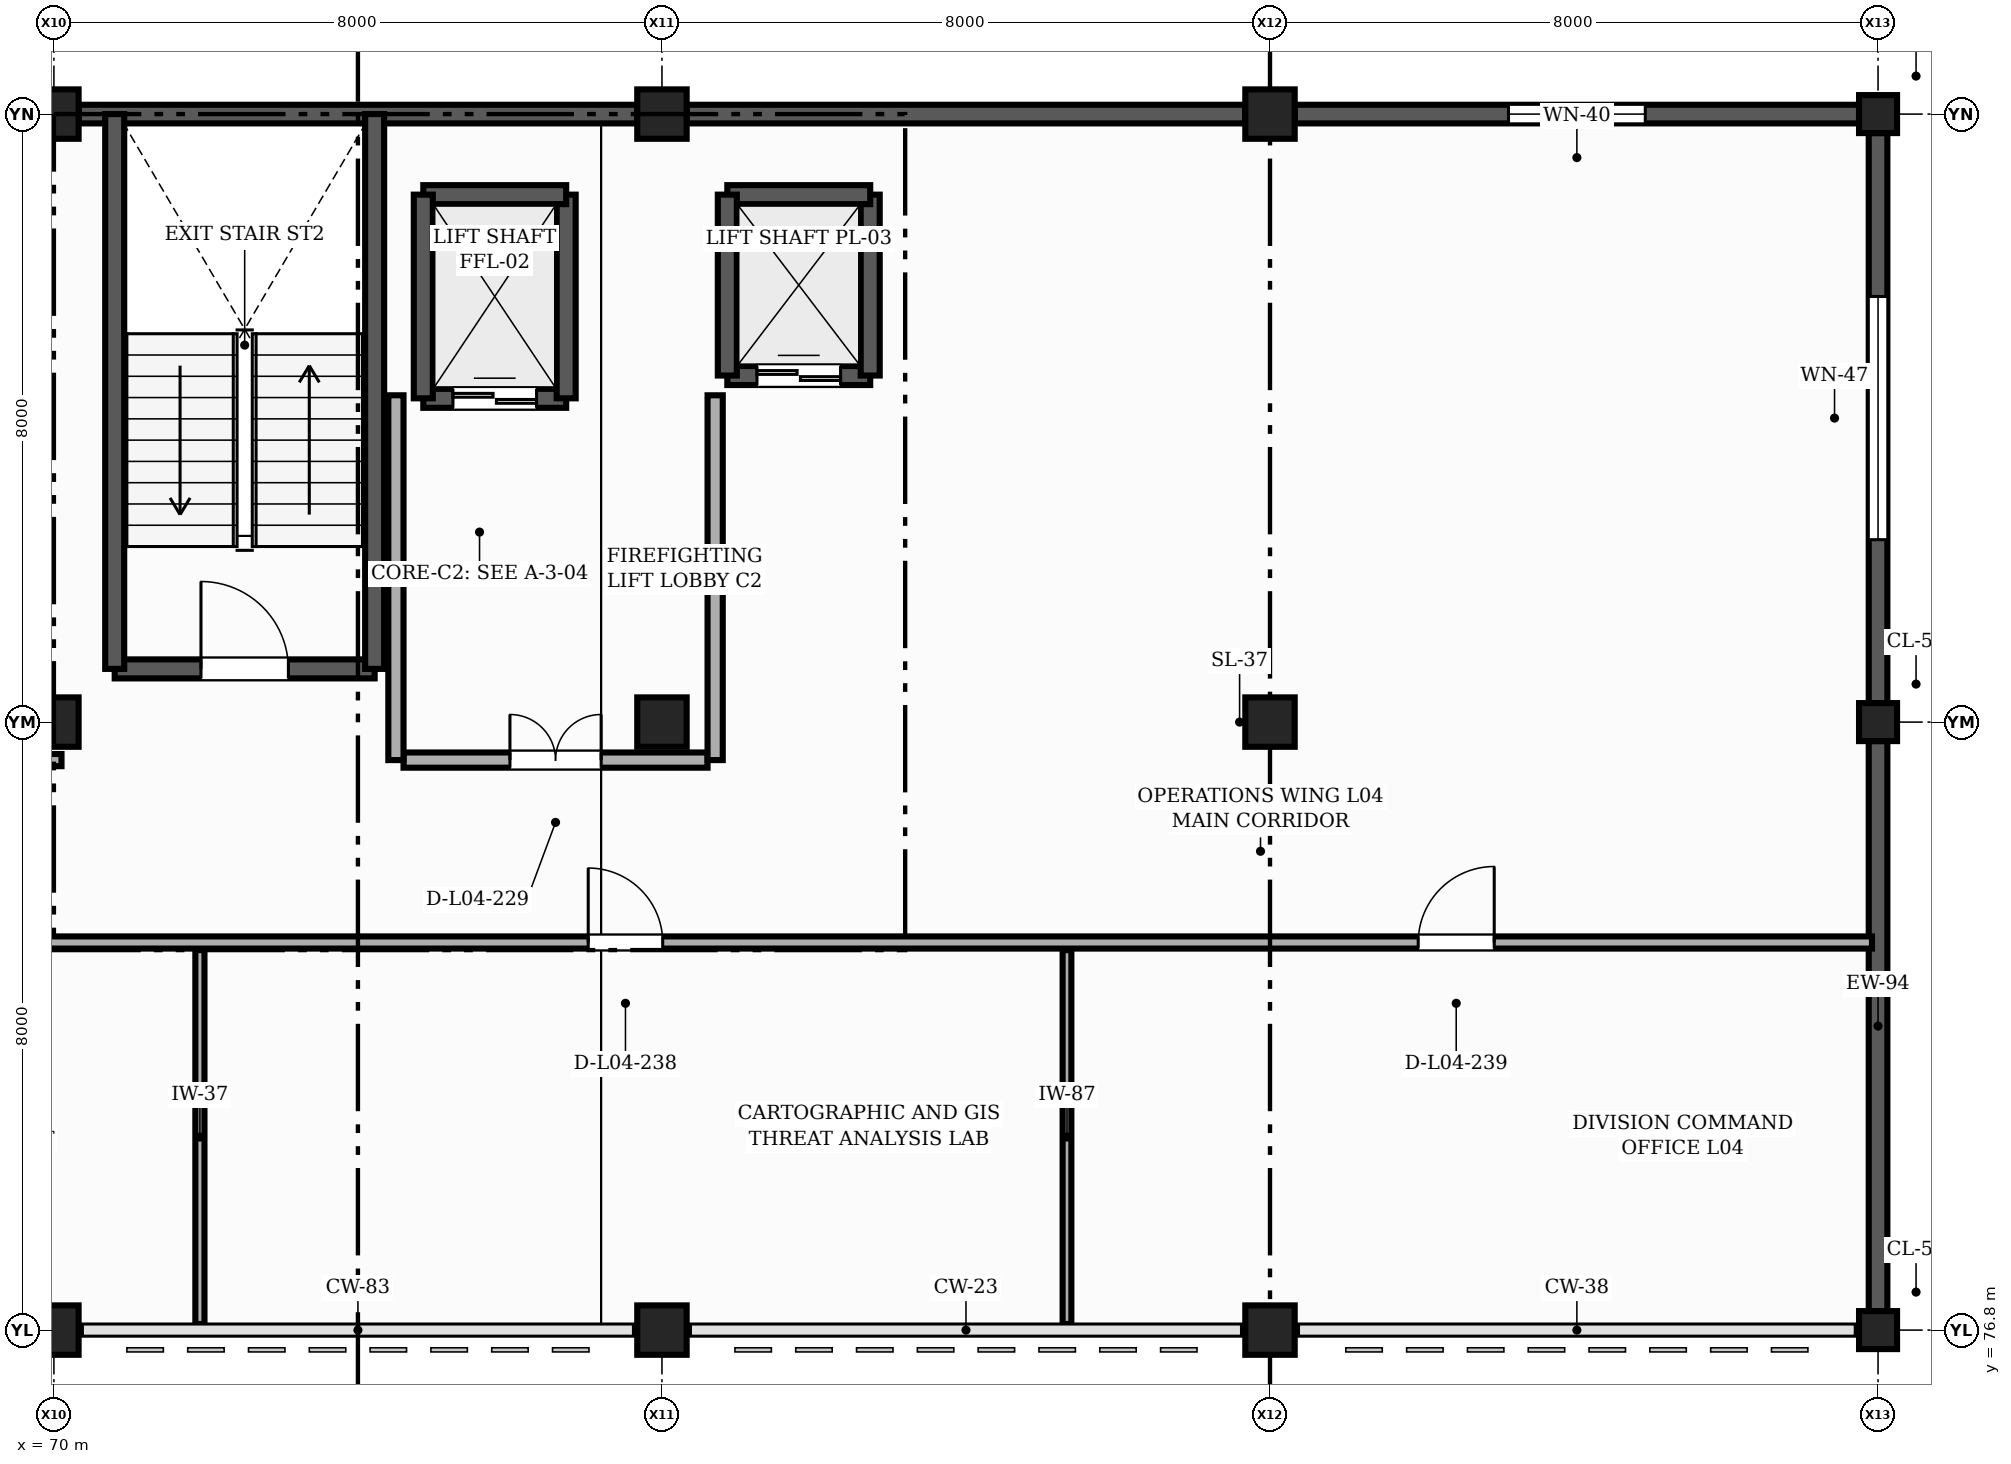
"""IFC4 building model, lengths in metres.
Left out: names, types, materials, properties, quantities, classifications, styles, units other than length and angle.
Written with IfcOpenShell. Run it as: python <this file> out.ifc"""

import sys

from ifc_helpers import new_model, si_unit, direction, frame, frame_2d, origin, origin_2d, place, context, subcontext, project, spatial, rectangle, extrude, element, fill, save


model = new_model("IFC4")
c1 = context("Model", 3, precision=1e-05, world=origin(), true_north=direction((0.0, 1.0)))
c2 = subcontext(c1, "Body", "Model", "MODEL_VIEW")
j1 = project(units=[si_unit("LENGTHUNIT", "METRE"), si_unit("PLANEANGLEUNIT", "RADIAN")], contexts=[c1])
p1 = place(None, origin())
s1 = spatial("IfcSite", under=j1, at=p1, CompositionType="ELEMENT")
p2 = place(p1, origin())
s2 = spatial("IfcBuilding", under=s1, at=p2, CompositionType="ELEMENT")
p3 = place(p2, frame((0.0, 0.0, 18.0)))
s3 = spatial("IfcBuildingStorey", under=s2, at=p3, CompositionType="ELEMENT", Elevation=18.0)
for number, where, z_axis, x_axis in (
    (1, (70.0, 76.8, 0.0), (0.0, 0.0, 1.0), (1.0, 0.0, 0.0)),
    (2, (70.0, 84.8, 0.0), (0.0, 0.0, 1.0), (1.0, 0.0, 0.0)),
    (3, (70.0, 92.8, 0.0), (0.0, 0.0, 1.0), (1.0, 0.0, 0.0)),
    (4, (78.0, 76.8, 0.0), (0.0, 0.0, 1.0), (1.0, 0.0, 0.0)),
    (5, (78.0, 84.8, 0.0), (0.0, 0.0, 1.0), (1.0, 0.0, 0.0)),
    (6, (78.0, 92.8, 0.0), (0.0, 0.0, 1.0), (1.0, 0.0, 0.0)),
    (7, (86.0, 76.8, 0.0), (0.0, 0.0, 1.0), (1.0, 0.0, 0.0)),
    (8, (86.0, 84.8, 0.0), (0.0, 0.0, 1.0), (1.0, 0.0, 0.0)),
    (9, (86.0, 92.8, 0.0), (0.0, 0.0, 1.0), (1.0, 0.0, 0.0)),
):
    element("IfcColumn", number, at=place(p3, frame(where, z_axis=z_axis, x_axis=x_axis)), inside=s3, PredefinedType="COLUMN", context=c2, shape_type="SweptSolid", body=[
        extrude(rectangle(XDim=0.65, YDim=0.65, at=origin_2d()), origin(), (0.0, 0.0, 1.0), 3.9),
    ])
for number, where, z_axis, x_axis in (
    (10, (94.0, 76.8, 0.0), (0.0, 0.0, 1.0), (1.0, 0.0, 0.0)),
    (11, (94.0, 84.8, 0.0), (0.0, 0.0, 1.0), (1.0, 0.0, 0.0)),
    (12, (94.0, 92.8, 0.0), (0.0, 0.0, 1.0), (1.0, 0.0, 0.0)),
):
    element("IfcColumn", number, at=place(p3, frame(where, z_axis=z_axis, x_axis=x_axis)), inside=s3, PredefinedType="COLUMN", context=c2, shape_type="SweptSolid", body=[
        extrude(rectangle(XDim=0.5, YDim=0.5, at=origin_2d()), origin(), (0.0, 0.0, 1.0), 3.9),
    ])
p4 = place(p3, frame((94.0, 77.05, 0.0), z_axis=(0.0, 0.0, 1.0), x_axis=(0.0, 1.0, 0.0)))
e13 = element("IfcWall", 13, at=p4, inside=s3, PredefinedType="SOLIDWALL", context=c2, shape_type="SweptSolid", body=[
    extrude(rectangle(XDim=7.5, YDim=0.245, at=frame_2d((3.75, 0.0))), origin(), (0.0, 0.0, 1.0), 2.99),
])
p5 = place(p3, frame((94.0, 85.05, 0.0), z_axis=(0.0, 0.0, 1.0), x_axis=(0.0, 1.0, 0.0)))
e14 = element("IfcWall", 14, at=p5, inside=s3, PredefinedType="SOLIDWALL", context=c2, shape_type="SweptSolid", body=[
    extrude(rectangle(XDim=7.5, YDim=0.245, at=frame_2d((3.75, 0.0))), origin(), (0.0, 0.0, 1.0), 2.99),
])
p6 = place(p5, frame((2.15, 0.0, 0.9)))
e15 = element("IfcOpeningElement", 15, at=p6, cuts=e14, PredefinedType="OPENING", context=c2, shape_type="SweptSolid", body=[
    extrude(rectangle(XDim=3.2, YDim=1.6, at=frame_2d((1.6, 0.8))), frame((0.0, 0.133, 0.0), z_axis=(0.0, -1.0, 0.0), x_axis=(1.0, 0.0, 0.0)), (0.0, 0.0, 1.0), 0.265),
])
p7 = place(p3, frame((93.75, 92.8, 0.0), z_axis=(0.0, 0.0, 1.0), x_axis=(-1.0, 0.0, 0.0)))
e16 = element("IfcWall", 16, at=p7, inside=s3, PredefinedType="SOLIDWALL", context=c2, shape_type="SweptSolid", body=[
    extrude(rectangle(XDim=7.425, YDim=0.245, at=frame_2d((3.712, 0.0))), origin(), (0.0, 0.0, 1.0), 2.99),
])
p8 = place(p7, frame((2.812, 0.0, 1.6)))
e17 = element("IfcOpeningElement", 17, at=p8, cuts=e16, PredefinedType="OPENING", context=c2, shape_type="SweptSolid", body=[
    extrude(rectangle(XDim=1.8, YDim=0.75, at=frame_2d((0.9, 0.375))), frame((0.0, 0.133, 0.0), z_axis=(0.0, -1.0, 0.0), x_axis=(1.0, 0.0, 0.0)), (0.0, 0.0, 1.0), 0.265),
])
p9 = place(p3, frame((85.675, 92.8, 0.0), z_axis=(0.0, 0.0, 1.0), x_axis=(-1.0, 0.0, 0.0)))
e18 = element("IfcWall", 18, at=p9, inside=s3, PredefinedType="SOLIDWALL", context=c2, shape_type="SweptSolid", body=[
    extrude(rectangle(XDim=7.35, YDim=0.245, at=frame_2d((3.675, 0.0))), origin(), (0.0, 0.0, 1.0), 2.99),
])
p10 = place(p3, frame((77.675, 92.8, 0.0), z_axis=(0.0, 0.0, 1.0), x_axis=(-1.0, 0.0, 0.0)))
e19 = element("IfcWall", 19, at=p10, inside=s3, PredefinedType="SOLIDWALL", context=c2, shape_type="SweptSolid", body=[
    extrude(rectangle(XDim=7.35, YDim=0.245, at=frame_2d((3.675, 0.0))), origin(), (0.0, 0.0, 1.0), 3.64),
])
p11 = place(p3, frame((70.8, 85.5, 0.0), z_axis=(0.0, 0.0, 1.0), x_axis=(1.0, 0.0, 0.0)))
e20 = element("IfcWall", 20, at=p11, inside=s3, PredefinedType="SHEAR", context=c2, shape_type="SweptSolid", body=[
    extrude(rectangle(XDim=3.42, YDim=0.25, at=frame_2d((1.71, 0.0))), origin(), (0.0, 0.0, 1.0), 3.9),
])
p12 = place(p11, frame((1.135, 0.0, 0.0)))
e21 = element("IfcOpeningElement", 21, at=p12, cuts=e20, PredefinedType="OPENING", context=c2, shape_type="SweptSolid", body=[
    extrude(rectangle(XDim=1.15, YDim=2.15, at=frame_2d((0.575, 1.075))), frame((0.0, 0.135, 0.0), z_axis=(0.0, -1.0, 0.0), x_axis=(1.0, 0.0, 0.0)), (0.0, 0.0, 1.0), 0.27),
])
for number, where, z_axis, x_axis in (
    (22, (74.22, 85.5, 0.0), (0.0, 0.0, 1.0), (0.0, 1.0, 0.0)),
    (23, (70.8, 92.8, 0.0), (0.0, 0.0, 1.0), (0.0, -1.0, 0.0)),
):
    element("IfcWall", number, at=place(p3, frame(where, z_axis=z_axis, x_axis=x_axis)), inside=s3, PredefinedType="SHEAR", context=c2, shape_type="SweptSolid", body=[
        extrude(rectangle(XDim=7.3, YDim=0.25, at=frame_2d((3.65, 0.0))), origin(), (0.0, 0.0, 1.0), 3.9),
    ])
p13 = place(p3, frame((74.86, 89.06, 0.0), z_axis=(0.0, 0.0, 1.0), x_axis=(1.0, 0.0, 0.0)))
e24 = element("IfcWall", 24, at=p13, inside=s3, PredefinedType="SHEAR", context=c2, shape_type="SweptSolid", body=[
    extrude(rectangle(XDim=1.88, YDim=0.25, at=frame_2d((0.94, 0.0))), origin(), (0.0, 0.0, 1.0), 3.9),
])
p14 = place(p13, frame((0.39, 0.0, 0.0)))
e25 = element("IfcOpeningElement", 25, at=p14, cuts=e24, PredefinedType="OPENING", context=c2, shape_type="SweptSolid", body=[
    extrude(rectangle(XDim=1.1, YDim=2.2, at=frame_2d((0.55, 1.1))), frame((0.0, 0.135, 0.0), z_axis=(0.0, -1.0, 0.0), x_axis=(1.0, 0.0, 0.0)), (0.0, 0.0, 1.0), 0.27),
])
p15 = place(p3, frame((76.74, 89.06, 0.0), z_axis=(0.0, 0.0, 1.0), x_axis=(0.0, 1.0, 0.0)))
e26 = element("IfcWall", 26, at=p15, inside=s3, PredefinedType="SHEAR", context=c2, shape_type="SweptSolid", body=[
    extrude(rectangle(XDim=2.68, YDim=0.25, at=frame_2d((1.34, 0.0))), origin(), (0.0, 0.0, 1.0), 3.9),
])
p16 = place(p3, frame((76.74, 91.74, 0.0), z_axis=(0.0, 0.0, 1.0), x_axis=(-1.0, 0.0, 0.0)))
e27 = element("IfcWall", 27, at=p16, inside=s3, PredefinedType="SHEAR", context=c2, shape_type="SweptSolid", body=[
    extrude(rectangle(XDim=1.88, YDim=0.25, at=frame_2d((0.94, 0.0))), origin(), (0.0, 0.0, 1.0), 3.9),
])
p17 = place(p3, frame((74.86, 91.74, 0.0), z_axis=(0.0, 0.0, 1.0), x_axis=(0.0, -1.0, 0.0)))
e28 = element("IfcWall", 28, at=p17, inside=s3, PredefinedType="SHEAR", context=c2, shape_type="SweptSolid", body=[
    extrude(rectangle(XDim=2.68, YDim=0.25, at=frame_2d((1.34, 0.0))), origin(), (0.0, 0.0, 1.0), 3.9),
])
p18 = place(p3, frame((78.86, 89.36, 0.0), z_axis=(0.0, 0.0, 1.0), x_axis=(1.0, 0.0, 0.0)))
e29 = element("IfcWall", 29, at=p18, inside=s3, PredefinedType="SHEAR", context=c2, shape_type="SweptSolid", body=[
    extrude(rectangle(XDim=1.88, YDim=0.25, at=frame_2d((0.94, 0.0))), origin(), (0.0, 0.0, 1.0), 3.9),
])
p19 = place(p18, frame((0.39, 0.0, 0.0)))
e30 = element("IfcOpeningElement", 30, at=p19, cuts=e29, PredefinedType="OPENING", context=c2, shape_type="SweptSolid", body=[
    extrude(rectangle(XDim=1.1, YDim=2.2, at=frame_2d((0.55, 1.1))), frame((0.0, 0.135, 0.0), z_axis=(0.0, -1.0, 0.0), x_axis=(1.0, 0.0, 0.0)), (0.0, 0.0, 1.0), 0.27),
])
p20 = place(p3, frame((80.74, 89.36, 0.0), z_axis=(0.0, 0.0, 1.0), x_axis=(0.0, 1.0, 0.0)))
e31 = element("IfcWall", 31, at=p20, inside=s3, PredefinedType="SHEAR", context=c2, shape_type="SweptSolid", body=[
    extrude(rectangle(XDim=2.38, YDim=0.25, at=frame_2d((1.19, 0.0))), origin(), (0.0, 0.0, 1.0), 3.9),
])
p21 = place(p3, frame((80.74, 91.74, 0.0), z_axis=(0.0, 0.0, 1.0), x_axis=(-1.0, 0.0, 0.0)))
e32 = element("IfcWall", 32, at=p21, inside=s3, PredefinedType="SHEAR", context=c2, shape_type="SweptSolid", body=[
    extrude(rectangle(XDim=1.88, YDim=0.25, at=frame_2d((0.94, 0.0))), origin(), (0.0, 0.0, 1.0), 3.9),
])
p22 = place(p3, frame((78.86, 91.74, 0.0), z_axis=(0.0, 0.0, 1.0), x_axis=(0.0, -1.0, 0.0)))
e33 = element("IfcWall", 33, at=p22, inside=s3, PredefinedType="SHEAR", context=c2, shape_type="SweptSolid", body=[
    extrude(rectangle(XDim=2.38, YDim=0.25, at=frame_2d((1.19, 0.0))), origin(), (0.0, 0.0, 1.0), 3.9),
])
p23 = place(p3, frame((74.6, 84.3, 0.0), z_axis=(0.0, 0.0, 1.0), x_axis=(1.0, 0.0, 0.0)))
e34 = element("IfcWall", 34, at=p23, inside=s3, PredefinedType="PARTITIONING", context=c2, shape_type="SweptSolid", body=[
    extrude(rectangle(XDim=4.0, YDim=0.2, at=frame_2d((2.0, 0.0))), origin(), (0.0, 0.0, 1.0), 3.075),
])
p24 = place(p23, frame((1.4, 0.0, 0.0)))
e35 = element("IfcOpeningElement", 35, at=p24, cuts=e34, PredefinedType="OPENING", context=c2, shape_type="SweptSolid", body=[
    extrude(rectangle(XDim=1.2, YDim=2.15, at=frame_2d((0.6, 1.075))), frame((0.0, 0.11, 0.0), z_axis=(0.0, -1.0, 0.0), x_axis=(1.0, 0.0, 0.0)), (0.0, 0.0, 1.0), 0.22),
])
p25 = place(p3, frame((74.5, 84.3, 0.0), z_axis=(0.0, 0.0, 1.0), x_axis=(0.0, 1.0, 0.0)))
e36 = element("IfcWall", 36, at=p25, inside=s3, PredefinedType="PARTITIONING", context=c2, shape_type="SweptSolid", body=[
    extrude(rectangle(XDim=4.8, YDim=0.2, at=frame_2d((2.4, 0.0))), origin(), (0.0, 0.0, 1.0), 2.925),
])
p26 = place(p3, frame((78.7, 84.3, 0.0), z_axis=(0.0, 0.0, 1.0), x_axis=(0.0, 1.0, 0.0)))
e37 = element("IfcWall", 37, at=p26, inside=s3, PredefinedType="PARTITIONING", context=c2, shape_type="SweptSolid", body=[
    extrude(rectangle(XDim=4.8, YDim=0.2, at=frame_2d((2.4, 0.0))), origin(), (0.0, 0.0, 1.0), 2.975),
])
p27 = place(p3, frame((71.921, 76.88, 0.0), z_axis=(0.0, 0.0, 1.0), x_axis=(0.0, 1.0, 0.0)))
e38 = element("IfcWall", 38, at=p27, inside=s3, PredefinedType="PARTITIONING", context=c2, shape_type="SweptSolid", body=[
    extrude(rectangle(XDim=4.92, YDim=0.12, at=frame_2d((2.46, 0.0))), origin(), (0.0, 0.0, 1.0), 3.64),
])
p28 = place(p3, frame((83.329, 76.88, 0.0), z_axis=(0.0, 0.0, 1.0), x_axis=(0.0, 1.0, 0.0)))
e39 = element("IfcWall", 39, at=p28, inside=s3, PredefinedType="PARTITIONING", context=c2, shape_type="SweptSolid", body=[
    extrude(rectangle(XDim=4.92, YDim=0.115, at=frame_2d((2.46, 0.0))), origin(), (0.0, 0.0, 1.0), 3.275),
])
p29 = place(p3, frame((29.3, 81.9, 0.0), z_axis=(0.0, 0.0, 1.0), x_axis=(1.0, 0.0, 0.0)))
e40 = element("IfcWall", 40, at=p29, inside=s3, PredefinedType="PARTITIONING", context=c2, shape_type="SweptSolid", body=[
    extrude(rectangle(XDim=64.62, YDim=0.16, at=frame_2d((32.31, 0.0))), origin(), (0.0, 0.0, 1.0), 2.975),
])
p30 = place(p29, frame((7.76, 0.0, 0.0)))
e41 = element("IfcOpeningElement", 41, at=p30, cuts=e40, PredefinedType="OPENING", context=c2, shape_type="SweptSolid", body=[
    extrude(rectangle(XDim=0.9, YDim=2.1, at=frame_2d((0.45, 1.05))), frame((0.0, 0.09, 0.0), z_axis=(0.0, -1.0, 0.0), x_axis=(1.0, 0.0, 0.0)), (0.0, 0.0, 1.0), 0.18),
])
p31 = place(p29, frame((22.32, 0.0, 0.0)))
e42 = element("IfcOpeningElement", 42, at=p31, cuts=e40, PredefinedType="OPENING", context=c2, shape_type="SweptSolid", body=[
    extrude(rectangle(XDim=0.92, YDim=2.1, at=frame_2d((0.46, 1.05))), frame((0.0, 0.09, 0.0), z_axis=(0.0, -1.0, 0.0), x_axis=(1.0, 0.0, 0.0)), (0.0, 0.0, 1.0), 0.18),
])
p32 = place(p29, frame((35.28, 0.0, 0.0)))
e43 = element("IfcOpeningElement", 43, at=p32, cuts=e40, PredefinedType="OPENING", context=c2, shape_type="SweptSolid", body=[
    extrude(rectangle(XDim=0.95, YDim=2.1, at=frame_2d((0.475, 1.05))), frame((0.0, 0.09, 0.0), z_axis=(0.0, -1.0, 0.0), x_axis=(1.0, 0.0, 0.0)), (0.0, 0.0, 1.0), 0.18),
])
p33 = place(p29, frame((47.73, 0.0, 0.0)))
e44 = element("IfcOpeningElement", 44, at=p33, cuts=e40, PredefinedType="OPENING", context=c2, shape_type="SweptSolid", body=[
    extrude(rectangle(XDim=0.98, YDim=2.12, at=frame_2d((0.49, 1.06))), frame((0.0, 0.09, 0.0), z_axis=(0.0, -1.0, 0.0), x_axis=(1.0, 0.0, 0.0)), (0.0, 0.0, 1.0), 0.18),
])
p34 = place(p29, frame((58.65, 0.0, 0.0)))
e45 = element("IfcOpeningElement", 45, at=p34, cuts=e40, PredefinedType="OPENING", context=c2, shape_type="SweptSolid", body=[
    extrude(rectangle(XDim=1.0, YDim=2.1, at=frame_2d((0.5, 1.05))), frame((0.0, 0.09, 0.0), z_axis=(0.0, -1.0, 0.0), x_axis=(1.0, 0.0, 0.0)), (0.0, 0.0, 1.0), 0.18),
])
p35 = place(p3, frame((34.7, 84.3, 0.0), z_axis=(0.0, 0.0, 1.0), x_axis=(1.0, 0.0, 0.0)))
e46 = element("IfcWall", 46, at=p35, inside=s3, PredefinedType="PARTITIONING", context=c2, shape_type="SweptSolid", body=[
    extrude(rectangle(XDim=35.4, YDim=0.16, at=frame_2d((17.7, 0.0))), origin(), (0.0, 0.0, 1.0), 3.075),
])
p36 = place(p35, frame((5.92, 0.0, 0.0)))
e47 = element("IfcOpeningElement", 47, at=p36, cuts=e46, PredefinedType="OPENING", context=c2, shape_type="SweptSolid", body=[
    extrude(rectangle(XDim=1.02, YDim=2.12, at=frame_2d((0.51, 1.06))), frame((0.0, 0.09, 0.0), z_axis=(0.0, -1.0, 0.0), x_axis=(1.0, 0.0, 0.0)), (0.0, 0.0, 1.0), 0.18),
])
p37 = place(p35, frame((17.2, 0.0, 0.0)))
e48 = element("IfcOpeningElement", 48, at=p37, cuts=e46, PredefinedType="OPENING", context=c2, shape_type="SweptSolid", body=[
    extrude(rectangle(XDim=0.95, YDim=2.15, at=frame_2d((0.475, 1.075))), frame((0.0, 0.09, 0.0), z_axis=(0.0, -1.0, 0.0), x_axis=(1.0, 0.0, 0.0)), (0.0, 0.0, 1.0), 0.18),
])
p38 = place(p35, frame((28.48, 0.0, 0.0)))
e49 = element("IfcOpeningElement", 49, at=p38, cuts=e46, PredefinedType="OPENING", context=c2, shape_type="SweptSolid", body=[
    extrude(rectangle(XDim=1.08, YDim=2.14, at=frame_2d((0.54, 1.07))), frame((0.0, 0.09, 0.0), z_axis=(0.0, -1.0, 0.0), x_axis=(1.0, 0.0, 0.0)), (0.0, 0.0, 1.0), 0.18),
])
p39 = place(p6, origin())
e50 = element("IfcWindow", 50, at=p39, inside=s3, PartitioningType="SINGLE_PANEL", PredefinedType="WINDOW", context=c2, shape_type="SweptSolid", body=[
    extrude(rectangle(XDim=3.2, YDim=1.6, at=frame_2d((1.6, 0.8))), frame((0.0, 0.03, 0.0), z_axis=(0.0, -1.0, 0.0), x_axis=(1.0, 0.0, 0.0)), (0.0, 0.0, 1.0), 0.06),
])
fill(e15, e50)
p40 = place(p8, origin())
e51 = element("IfcWindow", 51, at=p40, inside=s3, PartitioningType="SINGLE_PANEL", PredefinedType="WINDOW", context=c2, shape_type="SweptSolid", body=[
    extrude(rectangle(XDim=1.8, YDim=0.75, at=frame_2d((0.9, 0.375))), frame((0.0, 0.03, 0.0), z_axis=(0.0, -1.0, 0.0), x_axis=(1.0, 0.0, 0.0)), (0.0, 0.0, 1.0), 0.06),
])
fill(e17, e51)
p41 = place(p12, origin())
e52 = element("IfcDoor", 52, at=p41, inside=s3, OperationType="SINGLE_SWING_LEFT", PredefinedType="DOOR", context=c2, shape_type="SweptSolid", body=[
    extrude(rectangle(XDim=1.15, YDim=2.15, at=frame_2d((0.575, 1.075))), frame((0.0, 0.025, 0.0), z_axis=(0.0, -1.0, 0.0), x_axis=(1.0, 0.0, 0.0)), (0.0, 0.0, 1.0), 0.05),
])
fill(e21, e52)
p42 = place(p14, origin())
e53 = element("IfcDoor", 53, at=p42, inside=s3, OperationType="DOUBLE_DOOR_SLIDING", PredefinedType="DOOR", context=c2, shape_type="SweptSolid", body=[
    extrude(rectangle(XDim=1.1, YDim=2.2, at=frame_2d((0.55, 1.1))), frame((0.0, 0.025, 0.0), z_axis=(0.0, -1.0, 0.0), x_axis=(1.0, 0.0, 0.0)), (0.0, 0.0, 1.0), 0.05),
])
fill(e25, e53)
p43 = place(p19, origin())
e54 = element("IfcDoor", 54, at=p43, inside=s3, OperationType="DOUBLE_DOOR_SLIDING", PredefinedType="DOOR", context=c2, shape_type="SweptSolid", body=[
    extrude(rectangle(XDim=1.1, YDim=2.2, at=frame_2d((0.55, 1.1))), frame((0.0, 0.025, 0.0), z_axis=(0.0, -1.0, 0.0), x_axis=(1.0, 0.0, 0.0)), (0.0, 0.0, 1.0), 0.05),
])
fill(e30, e54)
p44 = place(p24, origin())
e55 = element("IfcDoor", 55, at=p44, inside=s3, OperationType="DOUBLE_DOOR_SINGLE_SWING", PredefinedType="DOOR", context=c2, shape_type="SweptSolid", body=[
    extrude(rectangle(XDim=1.2, YDim=2.15, at=frame_2d((0.6, 1.075))), frame((0.0, 0.025, 0.0), z_axis=(0.0, -1.0, 0.0), x_axis=(1.0, 0.0, 0.0)), (0.0, 0.0, 1.0), 0.05),
])
fill(e35, e55)
p45 = place(p33, origin())
e56 = element("IfcDoor", 56, at=p45, inside=s3, OperationType="SINGLE_SWING_LEFT", PredefinedType="DOOR", context=c2, shape_type="SweptSolid", body=[
    extrude(rectangle(XDim=0.98, YDim=2.12, at=frame_2d((0.49, 1.06))), frame((0.0, 0.025, 0.0), z_axis=(0.0, -1.0, 0.0), x_axis=(1.0, 0.0, 0.0)), (0.0, 0.0, 1.0), 0.05),
])
fill(e44, e56)
p46 = place(p34, origin())
e57 = element("IfcDoor", 57, at=p46, inside=s3, OperationType="SINGLE_SWING_RIGHT", PredefinedType="DOOR", context=c2, shape_type="SweptSolid", body=[
    extrude(rectangle(XDim=1.0, YDim=2.1, at=frame_2d((0.5, 1.05))), frame((0.0, 0.025, 0.0), z_axis=(0.0, -1.0, 0.0), x_axis=(1.0, 0.0, 0.0)), (0.0, 0.0, 1.0), 0.05),
])
fill(e45, e57)
save(model, sys.argv[1])
